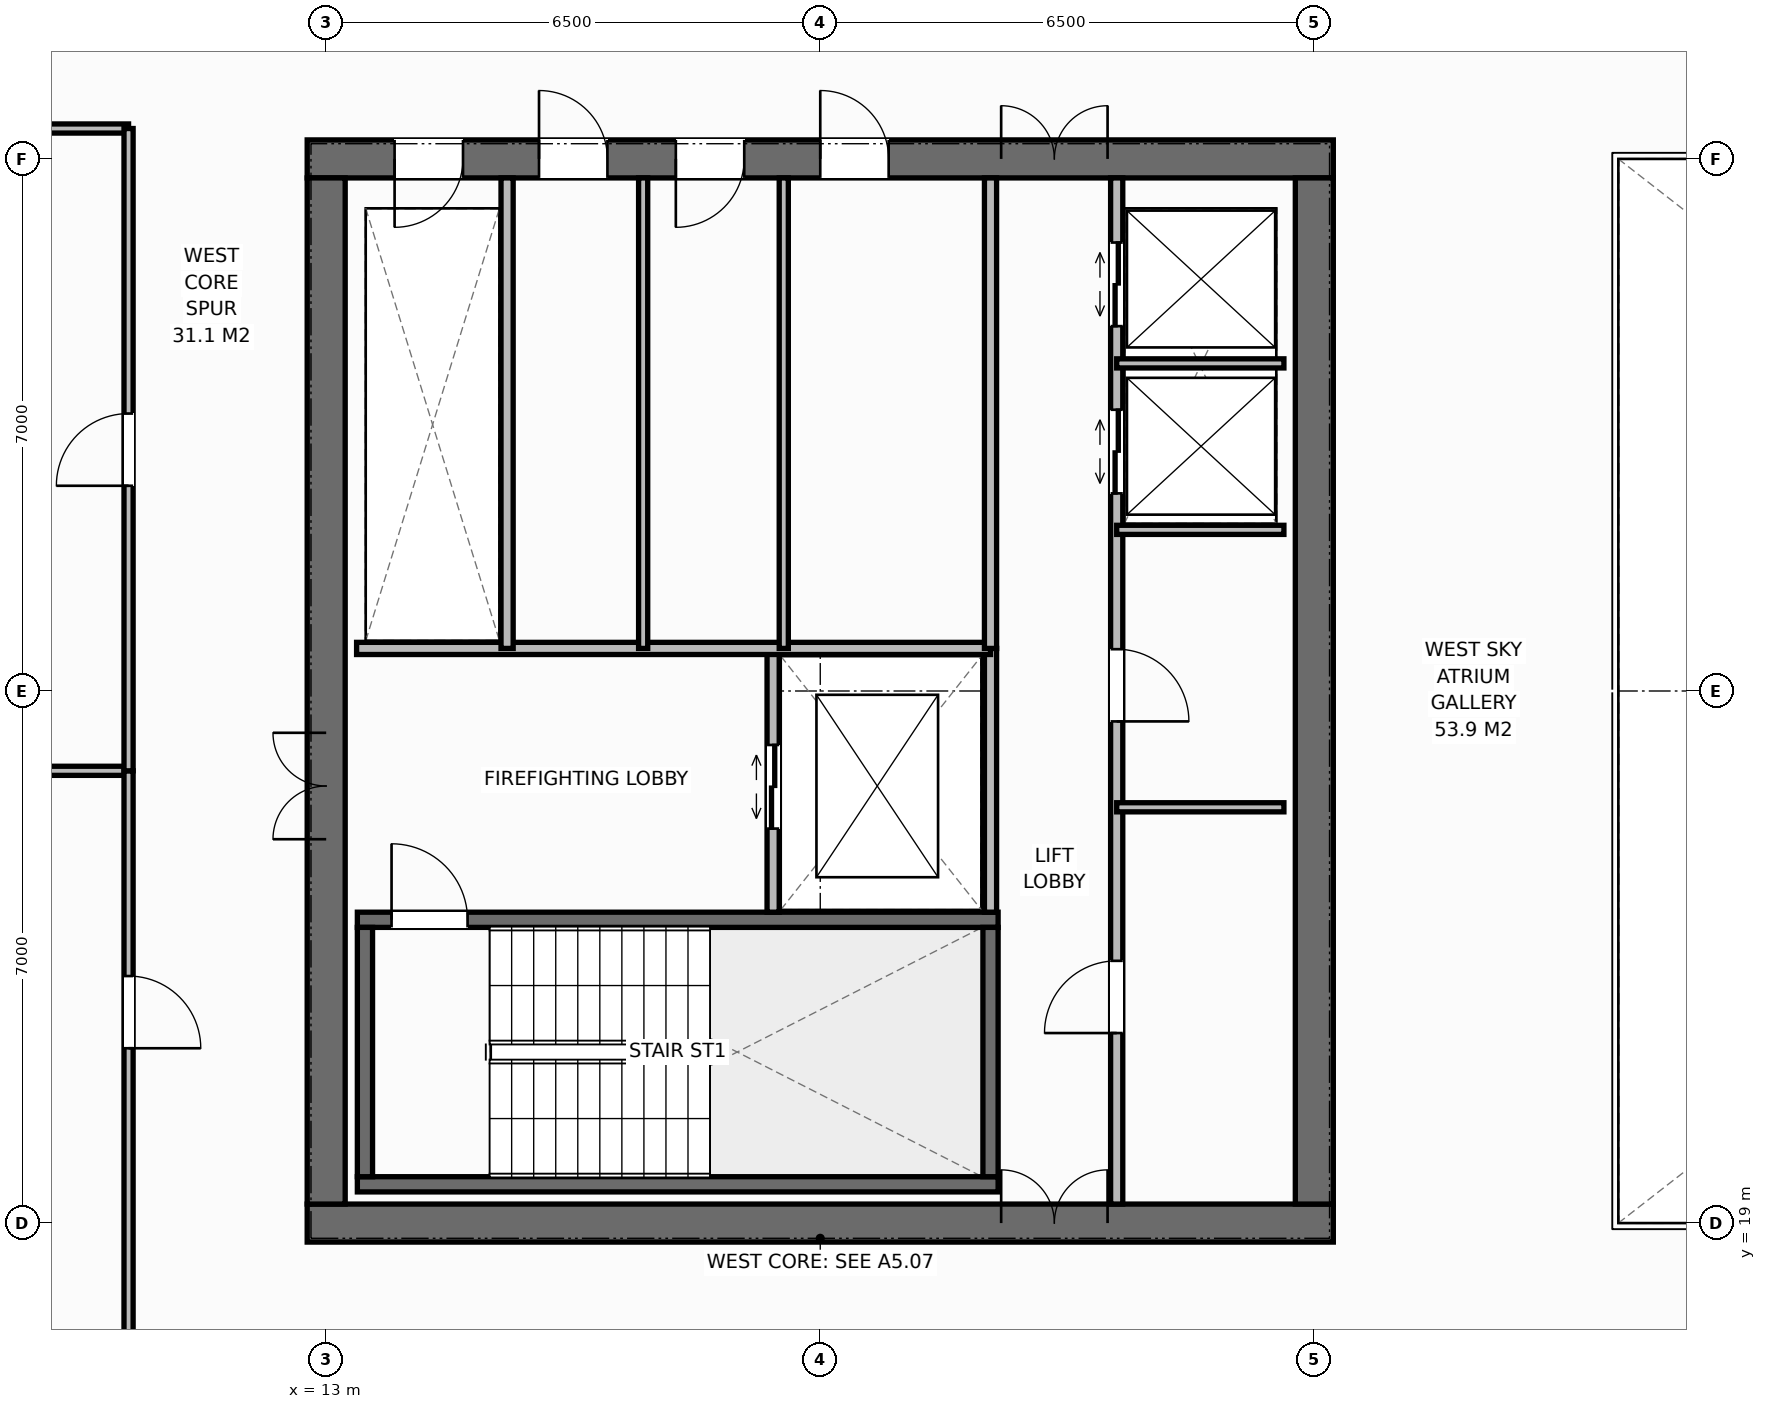
"""IFC4 building model, lengths in metres.
Left out: names, types, materials, properties, quantities, classifications, styles, units other than length and angle.
Written with IfcOpenShell. Run it as: python <this file> out.ifc"""

import sys

from ifc_helpers import new_model, si_unit, direction, frame, frame_2d, origin, place, context, subcontext, project, spatial, rectangle, extrude, element, fill, save


model = new_model("IFC4")
c1 = context("Model", 3, precision=1e-05, world=origin(), true_north=direction((0.0, 1.0)))
c2 = subcontext(c1, "Body", "Model", "MODEL_VIEW")
j1 = project(units=[si_unit("LENGTHUNIT", "METRE"), si_unit("PLANEANGLEUNIT", "RADIAN")], contexts=[c1])
p1 = place(None, origin())
s1 = spatial("IfcSite", under=j1, at=p1, CompositionType="ELEMENT")
p2 = place(p1, origin())
s2 = spatial("IfcBuilding", under=s1, at=p2, CompositionType="ELEMENT")
p3 = place(p2, frame((0.0, 0.0, 251.8)))
s3 = spatial("IfcBuildingStorey", under=s2, at=p3, CompositionType="ELEMENT", Elevation=251.8)
p4 = place(p3, frame((12.75, 19.0, 0.0), z_axis=(0.0, 0.0, 1.0), x_axis=(1.0, 0.0, 0.0)))
e1 = element("IfcWall", 1, at=p4, inside=s3, PredefinedType="SHEAR", context=c2, shape_type="SweptSolid", body=[
    extrude(rectangle(XDim=13.5, YDim=0.5, at=frame_2d((6.75, 0.0))), origin(), (0.0, 0.0, 1.0), 3.8),
])
p5 = place(p4, frame((9.13, 0.0, 0.0)))
e2 = element("IfcOpeningElement", 2, at=p5, cuts=e1, PredefinedType="OPENING", context=c2, shape_type="SweptSolid", body=[
    extrude(rectangle(XDim=1.4, YDim=2.2, at=frame_2d((0.7, 1.1))), frame((0.0, 0.26, 0.0), z_axis=(0.0, -1.0, 0.0), x_axis=(1.0, 0.0, 0.0)), (0.0, 0.0, 1.0), 0.52),
])
p6 = place(p3, frame((12.75, 33.0, 0.0), z_axis=(0.0, 0.0, 1.0), x_axis=(1.0, 0.0, 0.0)))
e3 = element("IfcWall", 3, at=p6, inside=s3, PredefinedType="SHEAR", context=c2, shape_type="SweptSolid", body=[
    extrude(rectangle(XDim=13.5, YDim=0.5, at=frame_2d((6.75, 0.0))), origin(), (0.0, 0.0, 1.0), 3.8),
])
p7 = place(p6, frame((1.15, 0.0, 0.0)))
e4 = element("IfcOpeningElement", 4, at=p7, cuts=e3, PredefinedType="OPENING", context=c2, shape_type="SweptSolid", body=[
    extrude(rectangle(XDim=0.9, YDim=2.15, at=frame_2d((0.45, 1.075))), frame((0.0, 0.26, 0.0), z_axis=(0.0, -1.0, 0.0), x_axis=(1.0, 0.0, 0.0)), (0.0, 0.0, 1.0), 0.52),
])
p8 = place(p6, frame((3.05, 0.0, 0.0)))
e5 = element("IfcOpeningElement", 5, at=p8, cuts=e3, PredefinedType="OPENING", context=c2, shape_type="SweptSolid", body=[
    extrude(rectangle(XDim=0.9, YDim=2.15, at=frame_2d((0.45, 1.075))), frame((0.0, 0.26, 0.0), z_axis=(0.0, -1.0, 0.0), x_axis=(1.0, 0.0, 0.0)), (0.0, 0.0, 1.0), 0.52),
])
p9 = place(p6, frame((4.85, 0.0, 0.0)))
e6 = element("IfcOpeningElement", 6, at=p9, cuts=e3, PredefinedType="OPENING", context=c2, shape_type="SweptSolid", body=[
    extrude(rectangle(XDim=0.9, YDim=2.15, at=frame_2d((0.45, 1.075))), frame((0.0, 0.26, 0.0), z_axis=(0.0, -1.0, 0.0), x_axis=(1.0, 0.0, 0.0)), (0.0, 0.0, 1.0), 0.52),
])
p10 = place(p6, frame((6.75, 0.0, 0.0)))
e7 = element("IfcOpeningElement", 7, at=p10, cuts=e3, PredefinedType="OPENING", context=c2, shape_type="SweptSolid", body=[
    extrude(rectangle(XDim=0.9, YDim=2.15, at=frame_2d((0.45, 1.075))), frame((0.0, 0.26, 0.0), z_axis=(0.0, -1.0, 0.0), x_axis=(1.0, 0.0, 0.0)), (0.0, 0.0, 1.0), 0.52),
])
p11 = place(p6, frame((9.13, 0.0, 0.0)))
e8 = element("IfcOpeningElement", 8, at=p11, cuts=e3, PredefinedType="OPENING", context=c2, shape_type="SweptSolid", body=[
    extrude(rectangle(XDim=1.4, YDim=2.2, at=frame_2d((0.7, 1.1))), frame((0.0, 0.26, 0.0), z_axis=(0.0, -1.0, 0.0), x_axis=(1.0, 0.0, 0.0)), (0.0, 0.0, 1.0), 0.52),
])
p12 = place(p3, frame((13.0, 19.25, 0.0), z_axis=(0.0, 0.0, 1.0), x_axis=(0.0, 1.0, 0.0)))
e9 = element("IfcWall", 9, at=p12, inside=s3, PredefinedType="SHEAR", context=c2, shape_type="SweptSolid", body=[
    extrude(rectangle(XDim=13.5, YDim=0.5, at=frame_2d((6.75, 0.0))), origin(), (0.0, 0.0, 1.0), 3.8),
])
p13 = place(p12, frame((4.8, 0.0, 0.0)))
e10 = element("IfcOpeningElement", 10, at=p13, cuts=e9, PredefinedType="OPENING", context=c2, shape_type="SweptSolid", body=[
    extrude(rectangle(XDim=1.4, YDim=2.2, at=frame_2d((0.7, 1.1))), frame((0.0, 0.26, 0.0), z_axis=(0.0, -1.0, 0.0), x_axis=(1.0, 0.0, 0.0)), (0.0, 0.0, 1.0), 0.52),
])
p14 = place(p3, frame((26.0, 19.25, 0.0), z_axis=(0.0, 0.0, 1.0), x_axis=(0.0, 1.0, 0.0)))
e11 = element("IfcWall", 11, at=p14, inside=s3, PredefinedType="SHEAR", context=c2, shape_type="SweptSolid", body=[
    extrude(rectangle(XDim=13.5, YDim=0.5, at=frame_2d((6.75, 0.0))), origin(), (0.0, 0.0, 1.0), 3.8),
])
p15 = place(p3, frame((13.41, 19.51, 0.0), z_axis=(0.0, 0.0, 1.0), x_axis=(1.0, 0.0, 0.0)))
e12 = element("IfcWall", 12, at=p15, inside=s3, PredefinedType="SHEAR", context=c2, shape_type="SweptSolid", body=[
    extrude(rectangle(XDim=8.43, YDim=0.2, at=frame_2d((4.215, 0.0))), origin(), (0.0, 0.0, 1.0), 3.8),
])
p16 = place(p3, frame((13.41, 22.99, 0.0), z_axis=(0.0, 0.0, 1.0), x_axis=(1.0, 0.0, 0.0)))
e13 = element("IfcWall", 13, at=p16, inside=s3, PredefinedType="SHEAR", context=c2, shape_type="SweptSolid", body=[
    extrude(rectangle(XDim=8.43, YDim=0.2, at=frame_2d((4.215, 0.0))), origin(), (0.0, 0.0, 1.0), 3.8),
])
p17 = place(p16, frame((0.45, 0.0, 0.0)))
e14 = element("IfcOpeningElement", 14, at=p17, cuts=e13, PredefinedType="OPENING", context=c2, shape_type="SweptSolid", body=[
    extrude(rectangle(XDim=1.0, YDim=2.15, at=frame_2d((0.5, 1.075))), frame((0.0, 0.11, 0.0), z_axis=(0.0, -1.0, 0.0), x_axis=(1.0, 0.0, 0.0)), (0.0, 0.0, 1.0), 0.22),
])
for number, where, z_axis, x_axis in (
    (15, (13.51, 19.61, 0.0), (0.0, 0.0, 1.0), (0.0, 1.0, 0.0)),
    (16, (21.74, 19.61, 0.0), (0.0, 0.0, 1.0), (0.0, 1.0, 0.0)),
):
    element("IfcWall", number, at=place(p3, frame(where, z_axis=z_axis, x_axis=x_axis)), inside=s3, PredefinedType="SHEAR", context=c2, shape_type="SweptSolid", body=[
        extrude(rectangle(XDim=3.28, YDim=0.2, at=frame_2d((1.64, 0.0))), origin(), (0.0, 0.0, 1.0), 3.8),
    ])
p18 = place(p3, frame((21.74, 23.09, 0.0), z_axis=(0.0, 0.0, 1.0), x_axis=(0.0, 1.0, 0.0)))
e17 = element("IfcWall", 17, at=p18, inside=s3, PredefinedType="STANDARD", context=c2, shape_type="SweptSolid", body=[
    extrude(rectangle(XDim=3.47, YDim=0.16, at=frame_2d((1.735, 0.0))), origin(), (0.0, 0.0, 1.0), 3.588),
])
p19 = place(p3, frame((18.88, 23.09, 0.0), z_axis=(0.0, 0.0, 1.0), x_axis=(0.0, 1.0, 0.0)))
e18 = element("IfcWall", 18, at=p19, inside=s3, PredefinedType="STANDARD", context=c2, shape_type="SweptSolid", body=[
    extrude(rectangle(XDim=3.47, YDim=0.16, at=frame_2d((1.735, 0.0))), origin(), (0.0, 0.0, 1.0), 3.588),
])
p20 = place(p19, frame((1.1, 0.0, 0.0)))
e19 = element("IfcOpeningElement", 19, at=p20, cuts=e18, PredefinedType="OPENING", context=c2, shape_type="SweptSolid", body=[
    extrude(rectangle(XDim=1.1, YDim=2.2, at=frame_2d((0.55, 1.1))), frame((0.0, 0.09, 0.0), z_axis=(0.0, -1.0, 0.0), x_axis=(1.0, 0.0, 0.0)), (0.0, 0.0, 1.0), 0.18),
])
p21 = place(p3, frame((13.4, 26.56, 0.0), z_axis=(0.0, 0.0, 1.0), x_axis=(1.0, 0.0, 0.0)))
e20 = element("IfcWall", 20, at=p21, inside=s3, PredefinedType="STANDARD", context=c2, shape_type="SweptSolid", body=[
    extrude(rectangle(XDim=8.34, YDim=0.16, at=frame_2d((4.17, 0.0))), origin(), (0.0, 0.0, 1.0), 3.588),
])
p22 = place(p3, frame((15.38, 26.56, 0.0), z_axis=(0.0, 0.0, 1.0), x_axis=(0.0, 1.0, 0.0)))
e21 = element("IfcWall", 21, at=p22, inside=s3, PredefinedType="STANDARD", context=c2, shape_type="SweptSolid", body=[
    extrude(rectangle(XDim=6.19, YDim=0.16, at=frame_2d((3.095, 0.0))), origin(), (0.0, 0.0, 1.0), 3.588),
])
for number, where, z_axis, x_axis in (
    (22, (17.17, 26.56, 0.0), (0.0, 0.0, 1.0), (0.0, 1.0, 0.0)),
    (23, (19.02, 26.56, 0.0), (0.0, 0.0, 1.0), (0.0, 1.0, 0.0)),
):
    element("IfcWall", number, at=place(p3, frame(where, z_axis=z_axis, x_axis=x_axis)), inside=s3, PredefinedType="PARTITIONING", context=c2, shape_type="SweptSolid", body=[
        extrude(rectangle(XDim=6.19, YDim=0.12, at=frame_2d((3.095, 0.0))), origin(), (0.0, 0.0, 1.0), 3.588),
    ])
p23 = place(p3, frame((21.74, 26.56, 0.0), z_axis=(0.0, 0.0, 1.0), x_axis=(0.0, 1.0, 0.0)))
e24 = element("IfcWall", 24, at=p23, inside=s3, PredefinedType="STANDARD", context=c2, shape_type="SweptSolid", body=[
    extrude(rectangle(XDim=6.19, YDim=0.16, at=frame_2d((3.095, 0.0))), origin(), (0.0, 0.0, 1.0), 3.588),
])
p24 = place(p3, frame((23.4, 19.25, 0.0), z_axis=(0.0, 0.0, 1.0), x_axis=(0.0, 1.0, 0.0)))
e25 = element("IfcWall", 25, at=p24, inside=s3, PredefinedType="STANDARD", context=c2, shape_type="SweptSolid", body=[
    extrude(rectangle(XDim=13.5, YDim=0.16, at=frame_2d((6.75, 0.0))), origin(), (0.0, 0.0, 1.0), 3.588),
])
p25 = place(p24, frame((2.25, 0.0, 0.0)))
e26 = element("IfcOpeningElement", 26, at=p25, cuts=e25, PredefinedType="OPENING", context=c2, shape_type="SweptSolid", body=[
    extrude(rectangle(XDim=0.95, YDim=2.15, at=frame_2d((0.475, 1.075))), frame((0.0, 0.09, 0.0), z_axis=(0.0, -1.0, 0.0), x_axis=(1.0, 0.0, 0.0)), (0.0, 0.0, 1.0), 0.18),
])
p26 = place(p24, frame((6.35, 0.0, 0.0)))
e27 = element("IfcOpeningElement", 27, at=p26, cuts=e25, PredefinedType="OPENING", context=c2, shape_type="SweptSolid", body=[
    extrude(rectangle(XDim=0.95, YDim=2.15, at=frame_2d((0.475, 1.075))), frame((0.0, 0.09, 0.0), z_axis=(0.0, -1.0, 0.0), x_axis=(1.0, 0.0, 0.0)), (0.0, 0.0, 1.0), 0.18),
])
p27 = place(p24, frame((9.35, 0.0, 0.0)))
e28 = element("IfcOpeningElement", 28, at=p27, cuts=e25, PredefinedType="OPENING", context=c2, shape_type="SweptSolid", body=[
    extrude(rectangle(XDim=1.1, YDim=2.2, at=frame_2d((0.55, 1.1))), frame((0.0, 0.09, 0.0), z_axis=(0.0, -1.0, 0.0), x_axis=(1.0, 0.0, 0.0)), (0.0, 0.0, 1.0), 0.18),
])
p28 = place(p24, frame((11.55, 0.0, 0.0)))
e29 = element("IfcOpeningElement", 29, at=p28, cuts=e25, PredefinedType="OPENING", context=c2, shape_type="SweptSolid", body=[
    extrude(rectangle(XDim=1.1, YDim=2.2, at=frame_2d((0.55, 1.1))), frame((0.0, 0.09, 0.0), z_axis=(0.0, -1.0, 0.0), x_axis=(1.0, 0.0, 0.0)), (0.0, 0.0, 1.0), 0.18),
])
for number, where, z_axis, x_axis in (
    (30, (23.4, 24.47, 0.0), (0.0, 0.0, 1.0), (1.0, 0.0, 0.0)),
    (31, (23.4, 28.12, 0.0), (0.0, 0.0, 1.0), (1.0, 0.0, 0.0)),
    (32, (23.4, 30.31, 0.0), (0.0, 0.0, 1.0), (1.0, 0.0, 0.0)),
):
    element("IfcWall", number, at=place(p3, frame(where, z_axis=z_axis, x_axis=x_axis)), inside=s3, PredefinedType="PARTITIONING", context=c2, shape_type="SweptSolid", body=[
        extrude(rectangle(XDim=2.2, YDim=0.12, at=frame_2d((1.1, 0.0))), origin(), (0.0, 0.0, 1.0), 3.588),
    ])
p29 = place(p3, frame((5.82, 33.4, 0.0), z_axis=(0.0, 0.0, 1.0), x_axis=(1.0, 0.0, 0.0)))
e33 = element("IfcWall", 33, at=p29, inside=s3, PredefinedType="PARTITIONING", context=c2, shape_type="SweptSolid", body=[
    extrude(rectangle(XDim=4.58, YDim=0.12, at=frame_2d((2.29, 0.0))), origin(), (0.0, 0.0, 1.0), 2.388),
])
p30 = place(p3, frame((5.82, 24.95, 0.0), z_axis=(0.0, 0.0, 1.0), x_axis=(1.0, 0.0, 0.0)))
e34 = element("IfcWall", 34, at=p30, inside=s3, PredefinedType="PARTITIONING", context=c2, shape_type="SweptSolid", body=[
    extrude(rectangle(XDim=4.58, YDim=0.12, at=frame_2d((2.29, 0.0))), origin(), (0.0, 0.0, 1.0), 3.588),
])
p31 = place(p3, frame((10.4, 16.5, 0.0), z_axis=(0.0, 0.0, 1.0), x_axis=(0.0, 1.0, 0.0)))
e35 = element("IfcWall", 35, at=p31, inside=s3, PredefinedType="PARTITIONING", context=c2, shape_type="SweptSolid", body=[
    extrude(rectangle(XDim=8.45, YDim=0.12, at=frame_2d((4.225, 0.0))), origin(), (0.0, 0.0, 1.0), 3.588),
])
p32 = place(p31, frame((4.8, 0.0, 0.0)))
e36 = element("IfcOpeningElement", 36, at=p32, cuts=e35, PredefinedType="OPENING", context=c2, shape_type="SweptSolid", body=[
    extrude(rectangle(XDim=0.95, YDim=2.15, at=frame_2d((0.475, 1.075))), frame((0.0, 0.07, 0.0), z_axis=(0.0, -1.0, 0.0), x_axis=(1.0, 0.0, 0.0)), (0.0, 0.0, 1.0), 0.14),
])
p33 = place(p3, frame((10.4, 24.95, 0.0), z_axis=(0.0, 0.0, 1.0), x_axis=(0.0, 1.0, 0.0)))
e37 = element("IfcWall", 37, at=p33, inside=s3, PredefinedType="PARTITIONING", context=c2, shape_type="SweptSolid", body=[
    extrude(rectangle(XDim=8.45, YDim=0.12, at=frame_2d((4.225, 0.0))), origin(), (0.0, 0.0, 1.0), 3.588),
])
p34 = place(p33, frame((3.75, 0.0, 0.0)))
e38 = element("IfcOpeningElement", 38, at=p34, cuts=e37, PredefinedType="OPENING", context=c2, shape_type="SweptSolid", body=[
    extrude(rectangle(XDim=0.95, YDim=2.15, at=frame_2d((0.475, 1.075))), frame((0.0, 0.07, 0.0), z_axis=(0.0, -1.0, 0.0), x_axis=(1.0, 0.0, 0.0)), (0.0, 0.0, 1.0), 0.14),
])
p35 = place(p17, origin())
e39 = element("IfcDoor", 39, at=p35, inside=s3, OperationType="SINGLE_SWING_LEFT", PredefinedType="DOOR", context=c2, shape_type="SweptSolid", body=[
    extrude(rectangle(XDim=1.0, YDim=2.15, at=frame_2d((0.5, 1.075))), frame((0.0, 0.025, 0.0), z_axis=(0.0, -1.0, 0.0), x_axis=(1.0, 0.0, 0.0)), (0.0, 0.0, 1.0), 0.05),
])
fill(e14, e39)
p36 = place(p13, origin())
e40 = element("IfcDoor", 40, at=p36, inside=s3, OperationType="DOUBLE_DOOR_SINGLE_SWING", PredefinedType="DOOR", context=c2, shape_type="SweptSolid", body=[
    extrude(rectangle(XDim=1.4, YDim=2.2, at=frame_2d((0.7, 1.1))), frame((0.0, 0.025, 0.0), z_axis=(0.0, -1.0, 0.0), x_axis=(1.0, 0.0, 0.0)), (0.0, 0.0, 1.0), 0.05),
])
fill(e10, e40)
p37 = place(p20, origin())
e41 = element("IfcDoor", 41, at=p37, inside=s3, OperationType="DOUBLE_DOOR_SLIDING", PredefinedType="DOOR", context=c2, shape_type="SweptSolid", body=[
    extrude(rectangle(XDim=1.1, YDim=2.2, at=frame_2d((0.55, 1.1))), frame((0.0, 0.025, 0.0), z_axis=(0.0, -1.0, 0.0), x_axis=(1.0, 0.0, 0.0)), (0.0, 0.0, 1.0), 0.05),
])
fill(e19, e41)
p38 = place(p7, origin())
e42 = element("IfcDoor", 42, at=p38, inside=s3, OperationType="SINGLE_SWING_RIGHT", PredefinedType="DOOR", context=c2, shape_type="SweptSolid", body=[
    extrude(rectangle(XDim=0.9, YDim=2.15, at=frame_2d((0.45, 1.075))), frame((0.0, -0.025, 0.0), z_axis=(0.0, -1.0, 0.0), x_axis=(1.0, 0.0, 0.0)), (0.0, 0.0, 1.0), 0.05),
])
fill(e4, e42)
p39 = place(p8, origin())
e43 = element("IfcDoor", 43, at=p39, inside=s3, OperationType="SINGLE_SWING_LEFT", PredefinedType="DOOR", context=c2, shape_type="SweptSolid", body=[
    extrude(rectangle(XDim=0.9, YDim=2.15, at=frame_2d((0.45, 1.075))), frame((0.0, -0.025, 0.0), z_axis=(0.0, -1.0, 0.0), x_axis=(1.0, 0.0, 0.0)), (0.0, 0.0, 1.0), 0.05),
])
fill(e5, e43)
p40 = place(p9, origin())
e44 = element("IfcDoor", 44, at=p40, inside=s3, OperationType="SINGLE_SWING_RIGHT", PredefinedType="DOOR", context=c2, shape_type="SweptSolid", body=[
    extrude(rectangle(XDim=0.9, YDim=2.15, at=frame_2d((0.45, 1.075))), frame((0.0, -0.025, 0.0), z_axis=(0.0, -1.0, 0.0), x_axis=(1.0, 0.0, 0.0)), (0.0, 0.0, 1.0), 0.05),
])
fill(e6, e44)
p41 = place(p10, origin())
e45 = element("IfcDoor", 45, at=p41, inside=s3, OperationType="SINGLE_SWING_LEFT", PredefinedType="DOOR", context=c2, shape_type="SweptSolid", body=[
    extrude(rectangle(XDim=0.9, YDim=2.15, at=frame_2d((0.45, 1.075))), frame((0.0, -0.025, 0.0), z_axis=(0.0, -1.0, 0.0), x_axis=(1.0, 0.0, 0.0)), (0.0, 0.0, 1.0), 0.05),
])
fill(e7, e45)
p42 = place(p5, origin())
e46 = element("IfcDoor", 46, at=p42, inside=s3, OperationType="DOUBLE_DOOR_SINGLE_SWING", PredefinedType="DOOR", context=c2, shape_type="SweptSolid", body=[
    extrude(rectangle(XDim=1.4, YDim=2.2, at=frame_2d((0.7, 1.1))), frame((0.0, 0.075, 0.0), z_axis=(0.0, -1.0, 0.0), x_axis=(1.0, 0.0, 0.0)), (0.0, 0.0, 1.0), 0.05),
])
fill(e2, e46)
p43 = place(p11, origin())
e47 = element("IfcDoor", 47, at=p43, inside=s3, OperationType="DOUBLE_DOOR_SINGLE_SWING", PredefinedType="DOOR", context=c2, shape_type="SweptSolid", body=[
    extrude(rectangle(XDim=1.4, YDim=2.2, at=frame_2d((0.7, 1.1))), frame((0.0, -0.025, 0.0), z_axis=(0.0, -1.0, 0.0), x_axis=(1.0, 0.0, 0.0)), (0.0, 0.0, 1.0), 0.05),
])
fill(e8, e47)
p44 = place(p25, origin())
e48 = element("IfcDoor", 48, at=p44, inside=s3, OperationType="SINGLE_SWING_LEFT", PredefinedType="DOOR", context=c2, shape_type="SweptSolid", body=[
    extrude(rectangle(XDim=0.95, YDim=2.15, at=frame_2d((0.475, 1.075))), frame((0.0, 0.025, 0.0), z_axis=(0.0, -1.0, 0.0), x_axis=(1.0, 0.0, 0.0)), (0.0, 0.0, 1.0), 0.05),
])
fill(e26, e48)
p45 = place(p26, origin())
e49 = element("IfcDoor", 49, at=p45, inside=s3, OperationType="SINGLE_SWING_RIGHT", PredefinedType="DOOR", context=c2, shape_type="SweptSolid", body=[
    extrude(rectangle(XDim=0.95, YDim=2.15, at=frame_2d((0.475, 1.075))), frame((0.0, 0.025, 0.0), z_axis=(0.0, -1.0, 0.0), x_axis=(1.0, 0.0, 0.0)), (0.0, 0.0, 1.0), 0.05),
])
fill(e27, e49)
p46 = place(p27, origin())
e50 = element("IfcDoor", 50, at=p46, inside=s3, OperationType="DOUBLE_DOOR_SLIDING", PredefinedType="DOOR", context=c2, shape_type="SweptSolid", body=[
    extrude(rectangle(XDim=1.1, YDim=2.2, at=frame_2d((0.55, 1.1))), frame((0.0, 0.025, 0.0), z_axis=(0.0, -1.0, 0.0), x_axis=(1.0, 0.0, 0.0)), (0.0, 0.0, 1.0), 0.05),
])
fill(e28, e50)
p47 = place(p28, origin())
e51 = element("IfcDoor", 51, at=p47, inside=s3, OperationType="DOUBLE_DOOR_SLIDING", PredefinedType="DOOR", context=c2, shape_type="SweptSolid", body=[
    extrude(rectangle(XDim=1.1, YDim=2.2, at=frame_2d((0.55, 1.1))), frame((0.0, 0.025, 0.0), z_axis=(0.0, -1.0, 0.0), x_axis=(1.0, 0.0, 0.0)), (0.0, 0.0, 1.0), 0.05),
])
fill(e29, e51)
p48 = place(p32, origin())
e52 = element("IfcDoor", 52, at=p48, inside=s3, OperationType="SINGLE_SWING_RIGHT", PredefinedType="DOOR", context=c2, shape_type="SweptSolid", body=[
    extrude(rectangle(XDim=0.95, YDim=2.15, at=frame_2d((0.475, 1.075))), frame((0.0, 0.025, 0.0), z_axis=(0.0, -1.0, 0.0), x_axis=(1.0, 0.0, 0.0)), (0.0, 0.0, 1.0), 0.05),
])
fill(e36, e52)
p49 = place(p34, origin())
e53 = element("IfcDoor", 53, at=p49, inside=s3, OperationType="SINGLE_SWING_LEFT", PredefinedType="DOOR", context=c2, shape_type="SweptSolid", body=[
    extrude(rectangle(XDim=0.95, YDim=2.15, at=frame_2d((0.475, 1.075))), frame((0.0, 0.025, 0.0), z_axis=(0.0, -1.0, 0.0), x_axis=(1.0, 0.0, 0.0)), (0.0, 0.0, 1.0), 0.05),
])
fill(e38, e53)
save(model, sys.argv[1])
